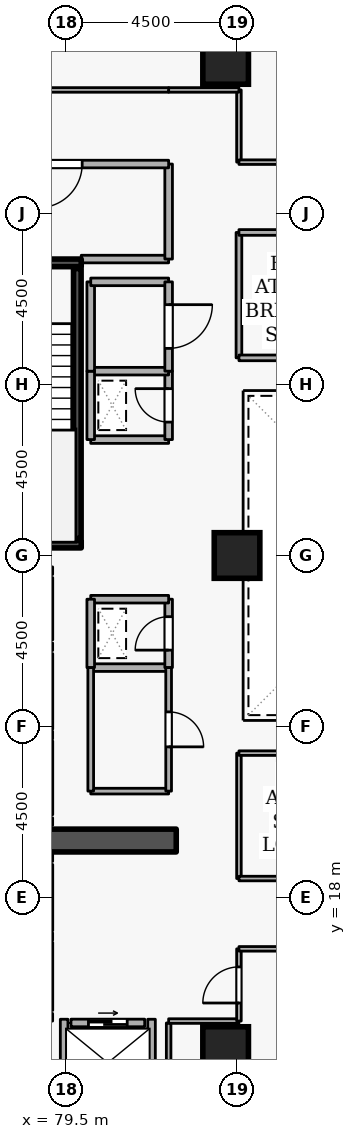
"""IFC4 building model, lengths in metres.
Left out: names, types, materials, properties, quantities, classifications, styles, units other than length and angle.
Written with IfcOpenShell. Run it as: python <this file> out.ifc"""

import sys

from ifc_helpers import new_model, si_unit, direction, frame, frame_2d, origin, origin_2d, place, context, subcontext, project, spatial, rectangle, extrude, element, fill, save


model = new_model("IFC4")
c1 = context("Model", 3, precision=1e-05, world=origin(), true_north=direction((0.0, 1.0)))
c2 = subcontext(c1, "Body", "Model", "MODEL_VIEW")
j1 = project(units=[si_unit("LENGTHUNIT", "METRE"), si_unit("PLANEANGLEUNIT", "RADIAN")], contexts=[c1])
p1 = place(None, origin())
s1 = spatial("IfcSite", under=j1, at=p1, CompositionType="ELEMENT")
p2 = place(p1, origin())
s2 = spatial("IfcBuilding", under=s1, at=p2, CompositionType="ELEMENT")
p3 = place(p2, frame((0.0, 0.0, 94.5)))
s3 = spatial("IfcBuildingStorey", under=s2, at=p3, CompositionType="ELEMENT", Elevation=94.5)
p4 = place(p3, frame((76.7, 19.5, 0.0), z_axis=(0.0, 0.0, 1.0), x_axis=(1.0, 0.0, 0.0)))
e1 = element("IfcWall", 1, at=p4, inside=s3, PredefinedType="SHEAR", context=c2, shape_type="SweptSolid", body=[
    extrude(rectangle(XDim=5.7, YDim=0.6, at=frame_2d((2.85, 0.0))), origin(), (0.0, 0.0, 1.0), 3.6),
])
for number, where, z_axis, x_axis in (
    (2, (83.7, 14.0, 0.0), (0.0, 0.0, 1.0), (1.0, 0.0, 0.0)),
    (3, (83.7, 40.0, 0.0), (0.0, 0.0, 1.0), (1.0, 0.0, 0.0)),
    (4, (84.0, 27.0, 0.0), (0.0, 0.0, 1.0), (1.0, 0.0, 0.0)),
):
    element("IfcColumn", number, at=place(p3, frame(where, z_axis=z_axis, x_axis=x_axis)), inside=s3, PredefinedType="COLUMN", context=c2, shape_type="SweptSolid", body=[
        extrude(rectangle(XDim=1.2, YDim=1.2, at=origin_2d()), origin(), (0.0, 0.0, 1.0), 3.6),
    ])
p5 = place(p3, frame((79.05, 24.78, 0.0), z_axis=(0.0, 0.0, 1.0), x_axis=(0.0, 1.0, 0.0)))
e5 = element("IfcWall", 5, at=p5, inside=s3, PredefinedType="STANDARD", context=c2, shape_type="SweptSolid", body=[
    extrude(rectangle(XDim=1.64, YDim=0.2, at=frame_2d((0.82, 0.0))), origin(), (0.0, 0.0, 1.0), 3.3),
])
p6 = place(p5, frame((0.31, 0.0, 0.0)))
e6 = element("IfcOpeningElement", 6, at=p6, cuts=e5, PredefinedType="OPENING", context=c2, shape_type="SweptSolid", body=[
    extrude(rectangle(XDim=1.02, YDim=2.06, at=frame_2d((0.51, 1.03))), frame((0.0, 0.11, 0.0), z_axis=(0.0, -1.0, 0.0), x_axis=(1.0, 0.0, 0.0)), (0.0, 0.0, 1.0), 0.22),
])
p7 = place(p3, frame((79.05, 22.43, 0.0), z_axis=(0.0, 0.0, 1.0), x_axis=(0.0, 1.0, 0.0)))
e7 = element("IfcWall", 7, at=p7, inside=s3, PredefinedType="STANDARD", context=c2, shape_type="SweptSolid", body=[
    extrude(rectangle(XDim=1.99, YDim=0.2, at=frame_2d((0.995, 0.0))), origin(), (0.0, 0.0, 1.0), 3.3),
])
p8 = place(p3, frame((79.05, 20.18, 0.0), z_axis=(0.0, 0.0, 1.0), x_axis=(0.0, 1.0, 0.0)))
e8 = element("IfcWall", 8, at=p8, inside=s3, PredefinedType="STANDARD", context=c2, shape_type="SweptSolid", body=[
    extrude(rectangle(XDim=1.94, YDim=0.2, at=frame_2d((0.97, 0.0))), origin(), (0.0, 0.0, 1.0), 3.3),
])
p9 = place(p3, frame((79.05, 17.13, 0.0), z_axis=(0.0, 0.0, 1.0), x_axis=(0.0, 1.0, 0.0)))
e9 = element("IfcWall", 9, at=p9, inside=s3, PredefinedType="STANDARD", context=c2, shape_type="SweptSolid", body=[
    extrude(rectangle(XDim=1.74, YDim=0.2, at=frame_2d((0.87, 0.0))), origin(), (0.0, 0.0, 1.0), 3.3),
])
p10 = place(p9, frame((0.36, 0.0, 0.0)))
e10 = element("IfcOpeningElement", 10, at=p10, cuts=e9, PredefinedType="OPENING", context=c2, shape_type="SweptSolid", body=[
    extrude(rectangle(XDim=1.02, YDim=2.06, at=frame_2d((0.51, 1.03))), frame((0.0, 0.11, 0.0), z_axis=(0.0, -1.0, 0.0), x_axis=(1.0, 0.0, 0.0)), (0.0, 0.0, 1.0), 0.22),
])
p11 = place(p3, frame((79.05, 15.03, 0.0), z_axis=(0.0, 0.0, 1.0), x_axis=(0.0, 1.0, 0.0)))
e11 = element("IfcWall", 11, at=p11, inside=s3, PredefinedType="STANDARD", context=c2, shape_type="SweptSolid", body=[
    extrude(rectangle(XDim=1.79, YDim=0.2, at=frame_2d((0.895, 0.0))), origin(), (0.0, 0.0, 1.0), 3.3),
])
p12 = place(p11, frame((0.385, 0.0, 0.0)))
e12 = element("IfcOpeningElement", 12, at=p12, cuts=e11, PredefinedType="OPENING", context=c2, shape_type="SweptSolid", body=[
    extrude(rectangle(XDim=1.02, YDim=2.06, at=frame_2d((0.51, 1.03))), frame((0.0, 0.11, 0.0), z_axis=(0.0, -1.0, 0.0), x_axis=(1.0, 0.0, 0.0)), (0.0, 0.0, 1.0), 0.22),
])
p13 = place(p3, frame((79.63, 14.7, 0.0), z_axis=(0.0, 0.0, 1.0), x_axis=(1.0, 0.0, 0.0)))
e13 = element("IfcWall", 13, at=p13, inside=s3, PredefinedType="STANDARD", context=c2, shape_type="SweptSolid", body=[
    extrude(rectangle(XDim=1.94, YDim=0.2, at=frame_2d((0.97, 0.0))), origin(), (0.0, 0.0, 1.0), 3.3),
])
p14 = place(p13, frame((0.46, 0.0, 0.0)))
e14 = element("IfcOpeningElement", 14, at=p14, cuts=e13, PredefinedType="OPENING", context=c2, shape_type="SweptSolid", body=[
    extrude(rectangle(XDim=1.02, YDim=2.06, at=frame_2d((0.51, 1.03))), frame((0.0, 0.11, 0.0), z_axis=(0.0, -1.0, 0.0), x_axis=(1.0, 0.0, 0.0)), (0.0, 0.0, 1.0), 0.22),
])
for number, where, z_axis, x_axis in (
    (15, (81.75, 12.612, 0.0), (0.0, 0.0, 1.0), (0.0, 1.0, 0.0)),
    (16, (79.45, 12.612, 0.0), (0.0, 0.0, 1.0), (0.0, 1.0, 0.0)),
):
    element("IfcWall", number, at=place(p3, frame(where, z_axis=z_axis, x_axis=x_axis)), inside=s3, PredefinedType="STANDARD", context=c2, shape_type="SweptSolid", body=[
        extrude(rectangle(XDim=2.186, YDim=0.2, at=frame_2d((1.093, 0.0))), origin(), (0.0, 0.0, 1.0), 3.3),
    ])
p15 = place(p3, frame((76.55, 34.7, 0.0), z_axis=(0.0, 0.0, 1.0), x_axis=(1.0, 0.0, 0.0)))
e17 = element("IfcWall", 17, at=p15, inside=s3, PredefinedType="SHEAR", context=c2, shape_type="SweptSolid", body=[
    extrude(rectangle(XDim=3.35, YDim=0.2, at=frame_2d((1.675, 0.0))), origin(), (0.0, 0.0, 1.0), 3.6),
])
p16 = place(p15, frame((1.125, 0.0, 0.0)))
e18 = element("IfcOpeningElement", 18, at=p16, cuts=e17, PredefinedType="OPENING", context=c2, shape_type="SweptSolid", body=[
    extrude(rectangle(XDim=1.1, YDim=2.1, at=frame_2d((0.55, 1.05))), frame((0.0, 0.11, 0.0), z_axis=(0.0, -1.0, 0.0), x_axis=(1.0, 0.0, 0.0)), (0.0, 0.0, 1.0), 0.22),
])
p17 = place(p3, frame((79.9, 27.3, 0.0), z_axis=(0.0, 0.0, 1.0), x_axis=(-1.0, 0.0, 0.0)))
e19 = element("IfcWall", 19, at=p17, inside=s3, PredefinedType="SHEAR", context=c2, shape_type="SweptSolid", body=[
    extrude(rectangle(XDim=3.35, YDim=0.2, at=frame_2d((1.675, 0.0))), origin(), (0.0, 0.0, 1.0), 3.6),
])
p18 = place(p3, frame((79.797, 27.45, 0.0), z_axis=(0.0, 0.0, 1.0), x_axis=(0.0, 1.0, 0.0)))
e20 = element("IfcWall", 20, at=p18, inside=s3, PredefinedType="SHEAR", context=c2, shape_type="SweptSolid", body=[
    extrude(rectangle(XDim=7.1, YDim=0.2, at=frame_2d((3.55, 0.0))), origin(), (0.0, 0.0, 1.0), 3.6),
])
p19 = place(p3, frame((79.9, 34.8, 0.0), z_axis=(0.0, 0.0, 1.0), x_axis=(1.0, 0.0, 0.0)))
e21 = element("IfcWall", 21, at=p19, inside=s3, PredefinedType="STANDARD", context=c2, shape_type="SweptSolid", body=[
    extrude(rectangle(XDim=2.3, YDim=0.2, at=frame_2d((1.15, 0.0))), origin(), (0.0, 0.0, 1.0), 2.505),
])
p20 = place(p3, frame((82.2, 34.8, 0.0), z_axis=(0.0, 0.0, 1.0), x_axis=(0.0, 1.0, 0.0)))
e22 = element("IfcWall", 22, at=p20, inside=s3, PredefinedType="STANDARD", context=c2, shape_type="SweptSolid", body=[
    extrude(rectangle(XDim=2.5, YDim=0.2, at=frame_2d((1.25, 0.0))), origin(), (0.0, 0.0, 1.0), 3.3),
])
p21 = place(p3, frame((82.2, 37.3, 0.0), z_axis=(0.0, 0.0, 1.0), x_axis=(-1.0, 0.0, 0.0)))
e23 = element("IfcWall", 23, at=p21, inside=s3, PredefinedType="STANDARD", context=c2, shape_type="SweptSolid", body=[
    extrude(rectangle(XDim=5.7, YDim=0.2, at=frame_2d((2.85, 0.0))), origin(), (0.0, 0.0, 1.0), 3.3),
])
p22 = place(p21, frame((2.275, 0.0, 0.0)))
e24 = element("IfcOpeningElement", 24, at=p22, cuts=e23, PredefinedType="OPENING", context=c2, shape_type="SweptSolid", body=[
    extrude(rectangle(XDim=1.15, YDim=2.1, at=frame_2d((0.575, 1.05))), frame((0.0, 0.11, 0.0), z_axis=(0.0, -1.0, 0.0), x_axis=(1.0, 0.0, 0.0)), (0.0, 0.0, 1.0), 0.22),
])
p23 = place(p3, frame((80.15, 24.05, 0.0), z_axis=(0.0, 0.0, 1.0), x_axis=(1.0, 0.0, 0.0)))
e25 = element("IfcWall", 25, at=p23, inside=s3, PredefinedType="STANDARD", context=c2, shape_type="SweptSolid", body=[
    extrude(rectangle(XDim=2.05, YDim=0.2, at=frame_2d((1.025, 0.0))), origin(), (0.0, 0.0, 1.0), 3.3),
])
p24 = place(p3, frame((82.2, 24.05, 0.0), z_axis=(0.0, 0.0, 1.0), x_axis=(0.0, 1.0, 0.0)))
e26 = element("IfcWall", 26, at=p24, inside=s3, PredefinedType="STANDARD", context=c2, shape_type="SweptSolid", body=[
    extrude(rectangle(XDim=1.8, YDim=0.2, at=frame_2d((0.9, 0.0))), origin(), (0.0, 0.0, 1.0), 3.3),
])
p25 = place(p24, frame((0.46, 0.0, 0.0)))
e27 = element("IfcOpeningElement", 27, at=p25, cuts=e26, PredefinedType="OPENING", context=c2, shape_type="SweptSolid", body=[
    extrude(rectangle(XDim=0.88, YDim=2.04, at=frame_2d((0.44, 1.02))), frame((0.0, 0.11, 0.0), z_axis=(0.0, -1.0, 0.0), x_axis=(1.0, 0.0, 0.0)), (0.0, 0.0, 1.0), 0.22),
])
p26 = place(p3, frame((82.2, 25.85, 0.0), z_axis=(0.0, 0.0, 1.0), x_axis=(-1.0, 0.0, 0.0)))
e28 = element("IfcWall", 28, at=p26, inside=s3, PredefinedType="STANDARD", context=c2, shape_type="SweptSolid", body=[
    extrude(rectangle(XDim=2.05, YDim=0.2, at=frame_2d((1.025, 0.0))), origin(), (0.0, 0.0, 1.0), 3.3),
])
p27 = place(p3, frame((80.15, 25.85, 0.0), z_axis=(0.0, 0.0, 1.0), x_axis=(0.0, -1.0, 0.0)))
e29 = element("IfcWall", 29, at=p27, inside=s3, PredefinedType="STANDARD", context=c2, shape_type="SweptSolid", body=[
    extrude(rectangle(XDim=1.8, YDim=0.2, at=frame_2d((0.9, 0.0))), origin(), (0.0, 0.0, 1.0), 3.3),
])
p28 = place(p3, frame((80.15, 30.05, 0.0), z_axis=(0.0, 0.0, 1.0), x_axis=(1.0, 0.0, 0.0)))
e30 = element("IfcWall", 30, at=p28, inside=s3, PredefinedType="STANDARD", context=c2, shape_type="SweptSolid", body=[
    extrude(rectangle(XDim=2.05, YDim=0.2, at=frame_2d((1.025, 0.0))), origin(), (0.0, 0.0, 1.0), 3.3),
])
p29 = place(p3, frame((82.2, 30.05, 0.0), z_axis=(0.0, 0.0, 1.0), x_axis=(0.0, 1.0, 0.0)))
e31 = element("IfcWall", 31, at=p29, inside=s3, PredefinedType="STANDARD", context=c2, shape_type="SweptSolid", body=[
    extrude(rectangle(XDim=1.8, YDim=0.2, at=frame_2d((0.9, 0.0))), origin(), (0.0, 0.0, 1.0), 3.3),
])
p30 = place(p29, frame((0.46, 0.0, 0.0)))
e32 = element("IfcOpeningElement", 32, at=p30, cuts=e31, PredefinedType="OPENING", context=c2, shape_type="SweptSolid", body=[
    extrude(rectangle(XDim=0.88, YDim=2.04, at=frame_2d((0.44, 1.02))), frame((0.0, 0.11, 0.0), z_axis=(0.0, -1.0, 0.0), x_axis=(1.0, 0.0, 0.0)), (0.0, 0.0, 1.0), 0.22),
])
p31 = place(p3, frame((82.2, 31.85, 0.0), z_axis=(0.0, 0.0, 1.0), x_axis=(-1.0, 0.0, 0.0)))
e33 = element("IfcWall", 33, at=p31, inside=s3, PredefinedType="STANDARD", context=c2, shape_type="SweptSolid", body=[
    extrude(rectangle(XDim=2.05, YDim=0.2, at=frame_2d((1.025, 0.0))), origin(), (0.0, 0.0, 1.0), 3.3),
])
p32 = place(p3, frame((80.15, 31.85, 0.0), z_axis=(0.0, 0.0, 1.0), x_axis=(0.0, -1.0, 0.0)))
e34 = element("IfcWall", 34, at=p32, inside=s3, PredefinedType="STANDARD", context=c2, shape_type="SweptSolid", body=[
    extrude(rectangle(XDim=1.8, YDim=0.2, at=frame_2d((0.9, 0.0))), origin(), (0.0, 0.0, 1.0), 3.3),
])
p33 = place(p3, frame((80.15, 31.85, 0.0), z_axis=(0.0, 0.0, 1.0), x_axis=(0.0, 1.0, 0.0)))
e35 = element("IfcWall", 35, at=p33, inside=s3, PredefinedType="STANDARD", context=c2, shape_type="SweptSolid", body=[
    extrude(rectangle(XDim=2.35, YDim=0.2, at=frame_2d((1.175, 0.0))), origin(), (0.0, 0.0, 1.0), 3.3),
])
p34 = place(p3, frame((80.15, 34.2, 0.0), z_axis=(0.0, 0.0, 1.0), x_axis=(1.0, 0.0, 0.0)))
e36 = element("IfcWall", 36, at=p34, inside=s3, PredefinedType="STANDARD", context=c2, shape_type="SweptSolid", body=[
    extrude(rectangle(XDim=2.05, YDim=0.2, at=frame_2d((1.025, 0.0))), origin(), (0.0, 0.0, 1.0), 2.505),
])
p35 = place(p3, frame((82.2, 34.2, 0.0), z_axis=(0.0, 0.0, 1.0), x_axis=(0.0, -1.0, 0.0)))
e37 = element("IfcWall", 37, at=p35, inside=s3, PredefinedType="STANDARD", context=c2, shape_type="SweptSolid", body=[
    extrude(rectangle(XDim=2.35, YDim=0.2, at=frame_2d((1.175, 0.0))), origin(), (0.0, 0.0, 1.0), 3.3),
])
p36 = place(p35, frame((0.6, 0.0, 0.0)))
e38 = element("IfcOpeningElement", 38, at=p36, cuts=e37, PredefinedType="OPENING", context=c2, shape_type="SweptSolid", body=[
    extrude(rectangle(XDim=1.15, YDim=2.1, at=frame_2d((0.575, 1.05))), frame((0.0, 0.11, 0.0), z_axis=(0.0, -1.0, 0.0), x_axis=(1.0, 0.0, 0.0)), (0.0, 0.0, 1.0), 0.22),
])
p37 = place(p3, frame((82.2, 20.8, 0.0), z_axis=(0.0, 0.0, 1.0), x_axis=(-1.0, 0.0, 0.0)))
e39 = element("IfcWall", 39, at=p37, inside=s3, PredefinedType="PARTITIONING", context=c2, shape_type="SweptSolid", body=[
    extrude(rectangle(XDim=2.05, YDim=0.15, at=frame_2d((1.025, 0.0))), origin(), (0.0, 0.0, 1.0), 3.3),
])
p38 = place(p3, frame((80.15, 20.8, 0.0), z_axis=(0.0, 0.0, 1.0), x_axis=(0.0, 1.0, 0.0)))
e40 = element("IfcWall", 40, at=p38, inside=s3, PredefinedType="PARTITIONING", context=c2, shape_type="SweptSolid", body=[
    extrude(rectangle(XDim=3.25, YDim=0.15, at=frame_2d((1.625, 0.0))), origin(), (0.0, 0.0, 1.0), 3.3),
])
p39 = place(p3, frame((82.2, 24.05, 0.0), z_axis=(0.0, 0.0, 1.0), x_axis=(0.0, -1.0, 0.0)))
e41 = element("IfcWall", 41, at=p39, inside=s3, PredefinedType="PARTITIONING", context=c2, shape_type="SweptSolid", body=[
    extrude(rectangle(XDim=3.25, YDim=0.15, at=frame_2d((1.625, 0.0))), origin(), (0.0, 0.0, 1.0), 3.3),
])
p40 = place(p39, frame((1.165, 0.0, 0.0)))
e42 = element("IfcOpeningElement", 42, at=p40, cuts=e41, PredefinedType="OPENING", context=c2, shape_type="SweptSolid", body=[
    extrude(rectangle(XDim=0.92, YDim=2.08, at=frame_2d((0.46, 1.04))), frame((0.0, 0.085, 0.0), z_axis=(0.0, -1.0, 0.0), x_axis=(1.0, 0.0, 0.0)), (0.0, 0.0, 1.0), 0.17),
])
p41 = place(p3, frame((82.2, 12.4, 0.0), z_axis=(0.0, 0.0, 1.0), x_axis=(0.0, 1.0, 0.0)))
e43 = element("IfcWall", 43, at=p41, inside=s3, PredefinedType="PARTITIONING", context=c2, shape_type="SweptSolid", body=[
    extrude(rectangle(XDim=2.3, YDim=0.12, at=frame_2d((1.15, 0.0))), origin(), (0.0, 0.0, 1.0), 3.3),
])
p42 = place(p3, frame((82.2, 14.75, 0.0), z_axis=(0.0, 0.0, 1.0), x_axis=(1.0, 0.0, 0.0)))
e44 = element("IfcWall", 44, at=p42, inside=s3, PredefinedType="PARTITIONING", context=c2, shape_type="SweptSolid", body=[
    extrude(rectangle(XDim=1.85, YDim=0.12, at=frame_2d((0.925, 0.0))), origin(), (0.0, 0.0, 1.0), 3.3),
])
p43 = place(p3, frame((84.05, 14.75, 0.0), z_axis=(0.0, 0.0, 1.0), x_axis=(0.0, 1.0, 0.0)))
e45 = element("IfcWall", 45, at=p43, inside=s3, PredefinedType="PARTITIONING", context=c2, shape_type="SweptSolid", body=[
    extrude(rectangle(XDim=1.9, YDim=0.12, at=frame_2d((0.95, 0.0))), origin(), (0.0, 0.0, 1.0), 3.3),
])
p44 = place(p43, frame((0.475, 0.0, 0.0)))
e46 = element("IfcOpeningElement", 46, at=p44, cuts=e45, PredefinedType="OPENING", context=c2, shape_type="SweptSolid", body=[
    extrude(rectangle(XDim=0.95, YDim=2.1, at=frame_2d((0.475, 1.05))), frame((0.0, 0.07, 0.0), z_axis=(0.0, -1.0, 0.0), x_axis=(1.0, 0.0, 0.0)), (0.0, 0.0, 1.0), 0.14),
])
p45 = place(p3, frame((84.05, 16.65, 0.0), z_axis=(0.0, 0.0, 1.0), x_axis=(1.0, 0.0, 0.0)))
e47 = element("IfcWall", 47, at=p45, inside=s3, PredefinedType="PARTITIONING", context=c2, shape_type="SweptSolid", body=[
    extrude(rectangle(XDim=1.3, YDim=0.12, at=frame_2d((0.65, 0.0))), origin(), (0.0, 0.0, 1.0), 3.3),
])
p46 = place(p3, frame((84.05, 37.35, 0.0), z_axis=(0.0, 0.0, 1.0), x_axis=(0.0, 1.0, 0.0)))
e48 = element("IfcWall", 48, at=p46, inside=s3, PredefinedType="PARTITIONING", context=c2, shape_type="SweptSolid", body=[
    extrude(rectangle(XDim=1.9, YDim=0.12, at=frame_2d((0.95, 0.0))), origin(), (0.0, 0.0, 1.0), 3.3),
])
p47 = place(p3, frame((84.05, 39.25, 0.0), z_axis=(0.0, 0.0, 1.0), x_axis=(-1.0, 0.0, 0.0)))
e49 = element("IfcWall", 49, at=p47, inside=s3, PredefinedType="PARTITIONING", context=c2, shape_type="SweptSolid", body=[
    extrude(rectangle(XDim=1.85, YDim=0.12, at=frame_2d((0.925, 0.0))), origin(), (0.0, 0.0, 1.0), 3.3),
])
p48 = place(p3, frame((82.2, 39.25, 0.0), z_axis=(0.0, 0.0, 1.0), x_axis=(-1.0, 0.0, 0.0)))
e50 = element("IfcWall", 50, at=p48, inside=s3, PredefinedType="PARTITIONING", context=c2, shape_type="SweptSolid", body=[
    extrude(rectangle(XDim=9.35, YDim=0.12, at=frame_2d((4.675, 0.0))), origin(), (0.0, 0.0, 1.0), 3.3),
])
p49 = place(p48, frame((4.15, 0.0, 0.0)))
e51 = element("IfcOpeningElement", 51, at=p49, cuts=e50, PredefinedType="OPENING", context=c2, shape_type="SweptSolid", body=[
    extrude(rectangle(XDim=1.05, YDim=2.1, at=frame_2d((0.525, 1.05))), frame((0.0, 0.07, 0.0), z_axis=(0.0, -1.0, 0.0), x_axis=(1.0, 0.0, 0.0)), (0.0, 0.0, 1.0), 0.14),
])
p50 = place(p3, frame((85.35, 37.35, 0.0), z_axis=(0.0, 0.0, 1.0), x_axis=(-1.0, 0.0, 0.0)))
e52 = element("IfcWall", 52, at=p50, inside=s3, PredefinedType="PARTITIONING", context=c2, shape_type="SweptSolid", body=[
    extrude(rectangle(XDim=1.3, YDim=0.12, at=frame_2d((0.65, 0.0))), origin(), (0.0, 0.0, 1.0), 3.3),
])
p51 = place(p3, frame((84.05, 32.2, 0.0), z_axis=(0.0, 0.0, 1.0), x_axis=(0.0, 1.0, 0.0)))
e53 = element("IfcWall", 53, at=p51, inside=s3, PredefinedType="PARTITIONING", context=c2, shape_type="SweptSolid", body=[
    extrude(rectangle(XDim=3.3, YDim=0.15, at=frame_2d((1.65, 0.0))), origin(), (0.0, 0.0, 1.0), 3.3),
])
p52 = place(p3, frame((84.05, 35.5, 0.0), z_axis=(0.0, 0.0, 1.0), x_axis=(1.0, 0.0, 0.0)))
e54 = element("IfcWall", 54, at=p52, inside=s3, PredefinedType="PARTITIONING", context=c2, shape_type="SweptSolid", body=[
    extrude(rectangle(XDim=8.9, YDim=0.15, at=frame_2d((4.45, 0.0))), origin(), (0.0, 0.0, 1.0), 3.3),
])
p53 = place(p52, frame((3.8, 0.0, 0.0)))
e55 = element("IfcOpeningElement", 55, at=p53, cuts=e54, PredefinedType="OPENING", context=c2, shape_type="SweptSolid", body=[
    extrude(rectangle(XDim=1.3, YDim=2.12, at=frame_2d((0.65, 1.06))), frame((0.0, 0.085, 0.0), z_axis=(0.0, -1.0, 0.0), x_axis=(1.0, 0.0, 0.0)), (0.0, 0.0, 1.0), 0.17),
])
p54 = place(p3, frame((92.95, 32.2, 0.0), z_axis=(0.0, 0.0, 1.0), x_axis=(-1.0, 0.0, 0.0)))
e56 = element("IfcWall", 56, at=p54, inside=s3, PredefinedType="PARTITIONING", context=c2, shape_type="SweptSolid", body=[
    extrude(rectangle(XDim=8.9, YDim=0.15, at=frame_2d((4.45, 0.0))), origin(), (0.0, 0.0, 1.0), 3.3),
])
p55 = place(p3, frame((84.05, 18.5, 0.0), z_axis=(0.0, 0.0, 1.0), x_axis=(0.0, 1.0, 0.0)))
e57 = element("IfcWall", 57, at=p55, inside=s3, PredefinedType="PARTITIONING", context=c2, shape_type="SweptSolid", body=[
    extrude(rectangle(XDim=3.3, YDim=0.12, at=frame_2d((1.65, 0.0))), origin(), (0.0, 0.0, 1.0), 3.3),
])
p56 = place(p3, frame((84.05, 21.8, 0.0), z_axis=(0.0, 0.0, 1.0), x_axis=(1.0, 0.0, 0.0)))
e58 = element("IfcWall", 58, at=p56, inside=s3, PredefinedType="PARTITIONING", context=c2, shape_type="SweptSolid", body=[
    extrude(rectangle(XDim=8.9, YDim=0.12, at=frame_2d((4.45, 0.0))), origin(), (0.0, 0.0, 1.0), 3.3),
])
p57 = place(p3, frame((92.95, 18.5, 0.0), z_axis=(0.0, 0.0, 1.0), x_axis=(-1.0, 0.0, 0.0)))
e59 = element("IfcWall", 59, at=p57, inside=s3, PredefinedType="PARTITIONING", context=c2, shape_type="SweptSolid", body=[
    extrude(rectangle(XDim=8.9, YDim=0.12, at=frame_2d((4.45, 0.0))), origin(), (0.0, 0.0, 1.0), 3.3),
])
p58 = place(p57, frame((2.875, 0.0, 0.0)))
e60 = element("IfcOpeningElement", 60, at=p58, cuts=e59, PredefinedType="OPENING", context=c2, shape_type="SweptSolid", body=[
    extrude(rectangle(XDim=0.95, YDim=2.1, at=frame_2d((0.475, 1.05))), frame((0.0, 0.07, 0.0), z_axis=(0.0, -1.0, 0.0), x_axis=(1.0, 0.0, 0.0)), (0.0, 0.0, 1.0), 0.14),
])
p59 = place(p14, origin())
e61 = element("IfcDoor", 61, at=p59, inside=s3, OperationType="SLIDING_TO_LEFT", PredefinedType="DOOR", context=c2, shape_type="SweptSolid", body=[
    extrude(rectangle(XDim=1.02, YDim=2.06, at=frame_2d((0.51, 1.03))), frame((0.0, 0.025, 0.0), z_axis=(0.0, -1.0, 0.0), x_axis=(1.0, 0.0, 0.0)), (0.0, 0.0, 1.0), 0.05),
])
fill(e14, e61)
p60 = place(p22, origin())
e62 = element("IfcDoor", 62, at=p60, inside=s3, OperationType="SINGLE_SWING_RIGHT", PredefinedType="DOOR", context=c2, shape_type="SweptSolid", body=[
    extrude(rectangle(XDim=1.15, YDim=2.1, at=frame_2d((0.575, 1.05))), frame((0.0, 0.025, 0.0), z_axis=(0.0, -1.0, 0.0), x_axis=(1.0, 0.0, 0.0)), (0.0, 0.0, 1.0), 0.05),
])
fill(e24, e62)
p61 = place(p25, origin())
e63 = element("IfcDoor", 63, at=p61, inside=s3, OperationType="SINGLE_SWING_LEFT", PredefinedType="DOOR", context=c2, shape_type="SweptSolid", body=[
    extrude(rectangle(XDim=0.88, YDim=2.04, at=frame_2d((0.44, 1.02))), frame((0.0, 0.025, 0.0), z_axis=(0.0, -1.0, 0.0), x_axis=(1.0, 0.0, 0.0)), (0.0, 0.0, 1.0), 0.05),
])
fill(e27, e63)
p62 = place(p30, origin())
e64 = element("IfcDoor", 64, at=p62, inside=s3, OperationType="SINGLE_SWING_RIGHT", PredefinedType="DOOR", context=c2, shape_type="SweptSolid", body=[
    extrude(rectangle(XDim=0.88, YDim=2.04, at=frame_2d((0.44, 1.02))), frame((0.0, 0.025, 0.0), z_axis=(0.0, -1.0, 0.0), x_axis=(1.0, 0.0, 0.0)), (0.0, 0.0, 1.0), 0.05),
])
fill(e32, e64)
p63 = place(p40, origin())
e65 = element("IfcDoor", 65, at=p63, inside=s3, OperationType="SINGLE_SWING_RIGHT", PredefinedType="DOOR", context=c2, shape_type="SweptSolid", body=[
    extrude(rectangle(XDim=0.92, YDim=2.08, at=frame_2d((0.46, 1.04))), frame((0.0, 0.025, 0.0), z_axis=(0.0, -1.0, 0.0), x_axis=(1.0, 0.0, 0.0)), (0.0, 0.0, 1.0), 0.05),
])
fill(e42, e65)
p64 = place(p36, origin())
e66 = element("IfcDoor", 66, at=p64, inside=s3, OperationType="SINGLE_SWING_LEFT", PredefinedType="DOOR", context=c2, shape_type="SweptSolid", body=[
    extrude(rectangle(XDim=1.15, YDim=2.1, at=frame_2d((0.575, 1.05))), frame((0.0, 0.025, 0.0), z_axis=(0.0, -1.0, 0.0), x_axis=(1.0, 0.0, 0.0)), (0.0, 0.0, 1.0), 0.05),
])
fill(e38, e66)
p65 = place(p44, origin())
e67 = element("IfcDoor", 67, at=p65, inside=s3, OperationType="SINGLE_SWING_LEFT", PredefinedType="DOOR", context=c2, shape_type="SweptSolid", body=[
    extrude(rectangle(XDim=0.95, YDim=2.1, at=frame_2d((0.475, 1.05))), frame((0.0, 0.025, 0.0), z_axis=(0.0, -1.0, 0.0), x_axis=(1.0, 0.0, 0.0)), (0.0, 0.0, 1.0), 0.05),
])
fill(e46, e67)
save(model, sys.argv[1])
